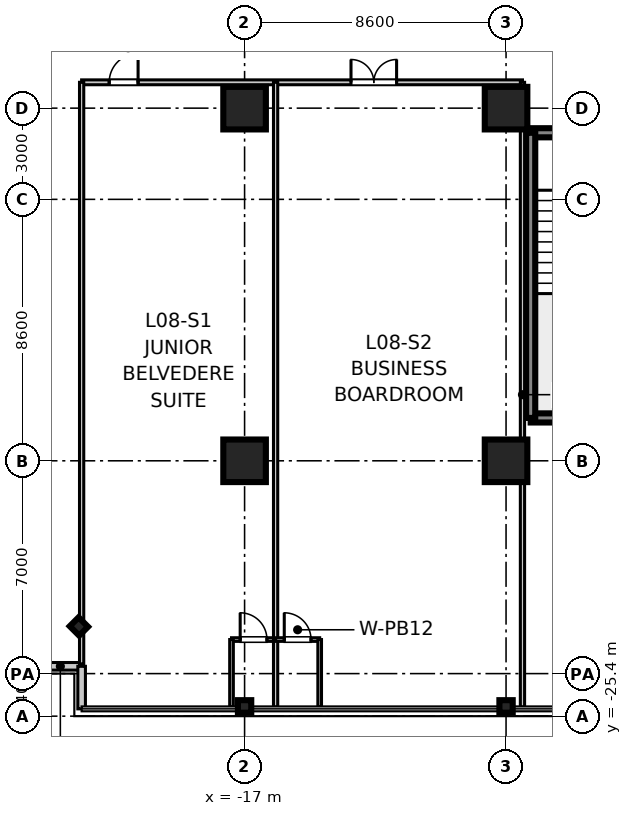
"""IFC4 building model, lengths in metres.
Left out: names, types, materials, properties, quantities, classifications, styles, units other than length and angle.
Written with IfcOpenShell. Run it as: python <this file> out.ifc"""

import sys

from ifc_helpers import new_model, si_unit, direction, frame, frame_2d, origin, origin_2d, place, context, subcontext, project, spatial, rectangle, i_section, extrude, source, transform, mapped, element, fill, save


model = new_model("IFC4")
c1 = context("Model", 3, precision=1e-05, world=origin(), true_north=direction((0.0, 1.0)))
c2 = subcontext(c1, "Body", "Model", "MODEL_VIEW")
j1 = project(units=[si_unit("LENGTHUNIT", "METRE"), si_unit("PLANEANGLEUNIT", "RADIAN")], contexts=[c1])
p1 = place(None, origin())
s1 = spatial("IfcSite", under=j1, at=p1, CompositionType="ELEMENT")
p2 = place(p1, origin())
s2 = spatial("IfcBuilding", under=s1, at=p2, CompositionType="ELEMENT")
p3 = place(p2, frame((0.0, 0.0, 39.7)))
s3 = spatial("IfcBuildingStorey", under=s2, at=p3, CompositionType="ELEMENT", Elevation=39.7)
m1 = source(origin(), c2, "Body", "SweptSolid", [
    extrude(rectangle(XDim=1.4, YDim=1.4, at=origin_2d()), origin(), (0.0, 0.0, 1.0), 3.605),
])
for number, where, z_axis, x_axis in (
    (1, (-17.0, -17.0, 0.0), (0.0, 0.0, 1.0), (1.0, 0.0, 0.0)),
    (2, (-17.0, -5.4, 0.0), (0.0, 0.0, 1.0), (1.0, 0.0, 0.0)),
    (3, (-8.4, -17.0, 0.0), (0.0, 0.0, 1.0), (1.0, 0.0, 0.0)),
    (4, (-8.4, -5.4, 0.0), (0.0, 0.0, 1.0), (1.0, 0.0, 0.0)),
):
    element("IfcColumn", number, at=place(p3, frame(where, z_axis=z_axis, x_axis=x_axis)), inside=s3, PredefinedType="COLUMN", context=c2, shape_type="MappedRepresentation", body=[
        mapped(m1, transform((0.0, 0.0, 0.0), scale=1.0)),
    ])
m2 = source(origin(), c2, "Body", "SweptSolid", [
    extrude(i_section(OverallWidth=0.412, OverallDepth=0.438, WebThickness=0.023, FlangeThickness=0.036, at=origin_2d()), origin(), (0.0, 0.0, 1.0), 3.605),
])
for number, where, z_axis, x_axis in (
    (5, (-17.0, -25.08, 0.0), (0.0, 0.0, 1.0), (0.0, 1.0, 0.0)),
    (6, (-8.4, -25.08, 0.0), (0.0, 0.0, 1.0), (0.0, 1.0, 0.0)),
    (7, (-22.45, -22.45, 0.0), (0.0, 0.0, 1.0), (0.707, 0.707, 0.0)),
):
    element("IfcColumn", number, at=place(p3, frame(where, z_axis=z_axis, x_axis=x_axis)), inside=s3, PredefinedType="COLUMN", context=c2, shape_type="MappedRepresentation", body=[
        mapped(m2, transform((0.0, 0.0, 0.0), scale=1.0)),
    ])
m3 = source(origin(), c2, "Body", "SweptSolid", [
    extrude(rectangle(XDim=3.98, YDim=0.3, at=frame_2d((1.99, 0.0))), origin(), (0.0, 0.0, 1.0), 3.37),
])
p4 = place(p3, frame((-7.59, -15.59, 0.0), z_axis=(0.0, 0.0, 1.0), x_axis=(1.0, 0.0, 0.0)))
e8 = element("IfcWall", 8, at=p4, inside=s3, PredefinedType="SHEAR", context=c2, shape_type="MappedRepresentation", body=[
    mapped(m3, transform((0.0, 0.0, 0.0), scale=1.0)),
])
p5 = place(p3, frame((-7.59, -6.21, 0.0), z_axis=(0.0, 0.0, 1.0), x_axis=(1.0, 0.0, 0.0)))
e9 = element("IfcWall", 9, at=p5, inside=s3, PredefinedType="SHEAR", context=c2, shape_type="MappedRepresentation", body=[
    mapped(m3, transform((0.0, 0.0, 0.0), scale=1.0)),
])
p6 = place(p5, frame((1.44, 0.0, 0.0)))
e10 = element("IfcOpeningElement", 10, at=p6, cuts=e9, PredefinedType="OPENING", context=c2, shape_type="SweptSolid", body=[
    extrude(rectangle(XDim=1.1, YDim=2.15, at=frame_2d((0.55, 1.075))), frame((0.0, 0.16, 0.0), z_axis=(0.0, -1.0, 0.0), x_axis=(1.0, 0.0, 0.0)), (0.0, 0.0, 1.0), 0.32),
])
m4 = source(origin(), c2, "Body", "SweptSolid", [
    extrude(rectangle(XDim=9.38, YDim=0.3, at=frame_2d((4.69, 0.0))), origin(), (0.0, 0.0, 1.0), 3.37),
])
p7 = place(p3, frame((-7.59, -15.59, 0.0), z_axis=(0.0, 0.0, 1.0), x_axis=(0.0, 1.0, 0.0)))
e11 = element("IfcWall", 11, at=p7, inside=s3, PredefinedType="SHEAR", context=c2, shape_type="MappedRepresentation", body=[
    mapped(m4, transform((0.0, 0.0, 0.0), scale=1.0)),
])
m5 = source(origin(), c2, "Body", "SweptSolid", [
    extrude(rectangle(XDim=1.4, YDim=0.25, at=frame_2d((0.7, 0.0))), origin(), (0.0, 0.0, 1.0), 3.37),
])
for number, where, z_axis, x_axis in (
    (12, (-23.76, -23.76, 0.0), (0.0, 0.0, 1.0), (1.0, 0.0, 0.0)),
    (13, (-22.36, -25.16, 0.0), (0.0, 0.0, 1.0), (0.0, 1.0, 0.0)),
):
    element("IfcWall", number, at=place(p3, frame(where, z_axis=z_axis, x_axis=x_axis)), inside=s3, PredefinedType="STANDARD", context=c2, shape_type="MappedRepresentation", body=[
        mapped(m5, transform((0.0, 0.0, 0.0), scale=1.0)),
    ])
m6 = source(origin(), c2, "Body", "SweptSolid", [
    extrude(rectangle(XDim=14.5, YDim=0.16, at=frame_2d((7.25, 0.0))), origin(), (0.0, 0.0, 1.0), 2.71),
])
p8 = place(p3, frame((-22.36, -4.55, 0.0), z_axis=(0.0, 0.0, 1.0), x_axis=(1.0, 0.0, 0.0)))
e14 = element("IfcWall", 14, at=p8, inside=s3, PredefinedType="PARTITIONING", context=c2, shape_type="MappedRepresentation", body=[
    mapped(m6, transform((0.0, 0.0, 0.0), scale=1.0)),
])
p9 = place(p8, frame((0.907, 0.0, 0.0)))
e15 = element("IfcOpeningElement", 15, at=p9, cuts=e14, PredefinedType="OPENING", context=c2, shape_type="SweptSolid", body=[
    extrude(rectangle(XDim=0.95, YDim=2.1, at=frame_2d((0.475, 1.05))), frame((0.0, 0.09, 0.0), z_axis=(0.0, -1.0, 0.0), x_axis=(1.0, 0.0, 0.0)), (0.0, 0.0, 1.0), 0.18),
])
p10 = place(p8, frame((8.86, 0.0, 0.0)))
e16 = element("IfcOpeningElement", 16, at=p10, cuts=e14, PredefinedType="OPENING", context=c2, shape_type="SweptSolid", body=[
    extrude(rectangle(XDim=1.5, YDim=2.15, at=frame_2d((0.75, 1.075))), frame((0.0, 0.09, 0.0), z_axis=(0.0, -1.0, 0.0), x_axis=(1.0, 0.0, 0.0)), (0.0, 0.0, 1.0), 0.18),
])
m7 = source(origin(), c2, "Body", "SweptSolid", [
    extrude(rectangle(XDim=19.13, YDim=0.14, at=frame_2d((9.565, 0.0))), origin(), (0.0, 0.0, 1.0), 2.71),
])
p11 = place(p3, frame((-22.36, -23.68, 0.0), z_axis=(0.0, 0.0, 1.0), x_axis=(0.0, 1.0, 0.0)))
e17 = element("IfcWall", 17, at=p11, inside=s3, PredefinedType="PARTITIONING", context=c2, shape_type="MappedRepresentation", body=[
    mapped(m7, transform((0.0, 0.0, 0.0), scale=1.0)),
])
m8 = source(origin(), c2, "Body", "SweptSolid", [
    extrude(rectangle(XDim=20.55, YDim=0.14, at=frame_2d((10.275, 0.0))), origin(), (0.0, 0.0, 1.0), 2.71),
])
p12 = place(p3, frame((-7.86, -25.1, 0.0), z_axis=(0.0, 0.0, 1.0), x_axis=(0.0, 1.0, 0.0)))
e18 = element("IfcWall", 18, at=p12, inside=s3, PredefinedType="PARTITIONING", context=c2, shape_type="MappedRepresentation", body=[
    mapped(m8, transform((0.0, 0.0, 0.0), scale=1.0)),
])
m9 = source(origin(), c2, "Body", "SweptSolid", [
    extrude(rectangle(XDim=1.45, YDim=0.12, at=frame_2d((0.725, 0.0))), origin(), (0.0, 0.0, 1.0), 2.71),
])
p13 = place(p3, frame((-17.43, -22.88, 0.0), z_axis=(0.0, 0.0, 1.0), x_axis=(1.0, 0.0, 0.0)))
e19 = element("IfcWall", 19, at=p13, inside=s3, PredefinedType="PARTITIONING", context=c2, shape_type="MappedRepresentation", body=[
    mapped(m9, transform((0.0, 0.0, 0.0), scale=1.0)),
])
p14 = place(p13, frame((0.285, 0.0, 0.0)))
e20 = element("IfcOpeningElement", 20, at=p14, cuts=e19, PredefinedType="OPENING", context=c2, shape_type="SweptSolid", body=[
    extrude(rectangle(XDim=0.88, YDim=2.1, at=frame_2d((0.44, 1.05))), frame((0.0, 0.07, 0.0), z_axis=(0.0, -1.0, 0.0), x_axis=(1.0, 0.0, 0.0)), (0.0, 0.0, 1.0), 0.14),
])
m10 = source(origin(), c2, "Body", "SweptSolid", [
    extrude(rectangle(XDim=2.22, YDim=0.12, at=frame_2d((1.11, 0.0))), origin(), (0.0, 0.0, 1.0), 2.71),
])
p15 = place(p3, frame((-17.43, -25.1, 0.0), z_axis=(0.0, 0.0, 1.0), x_axis=(0.0, 1.0, 0.0)))
e21 = element("IfcWall", 21, at=p15, inside=s3, PredefinedType="PARTITIONING", context=c2, shape_type="MappedRepresentation", body=[
    mapped(m10, transform((0.0, 0.0, 0.0), scale=1.0)),
])
p16 = place(p3, frame((-15.98, -25.1, 0.0), z_axis=(0.0, 0.0, 1.0), x_axis=(0.0, 1.0, 0.0)))
e22 = element("IfcWall", 22, at=p16, inside=s3, PredefinedType="PARTITIONING", context=c2, shape_type="MappedRepresentation", body=[
    mapped(m8, transform((0.0, 0.0, 0.0), scale=1.0)),
])
p17 = place(p3, frame((-15.98, -22.88, 0.0), z_axis=(0.0, 0.0, 1.0), x_axis=(1.0, 0.0, 0.0)))
e23 = element("IfcWall", 23, at=p17, inside=s3, PredefinedType="PARTITIONING", context=c2, shape_type="MappedRepresentation", body=[
    mapped(m9, transform((0.0, 0.0, 0.0), scale=1.0)),
])
p18 = place(p17, frame((0.285, 0.0, 0.0)))
e24 = element("IfcOpeningElement", 24, at=p18, cuts=e23, PredefinedType="OPENING", context=c2, shape_type="SweptSolid", body=[
    extrude(rectangle(XDim=0.88, YDim=2.1, at=frame_2d((0.44, 1.05))), frame((0.0, 0.07, 0.0), z_axis=(0.0, -1.0, 0.0), x_axis=(1.0, 0.0, 0.0)), (0.0, 0.0, 1.0), 0.14),
])
p19 = place(p3, frame((-14.53, -25.1, 0.0), z_axis=(0.0, 0.0, 1.0), x_axis=(0.0, 1.0, 0.0)))
e25 = element("IfcWall", 25, at=p19, inside=s3, PredefinedType="PARTITIONING", context=c2, shape_type="MappedRepresentation", body=[
    mapped(m10, transform((0.0, 0.0, 0.0), scale=1.0)),
])
m11 = source(origin(), c2, "Body", "SweptSolid", [
    extrude(rectangle(XDim=0.88, YDim=2.1, at=frame_2d((0.44, 1.05))), frame((0.0, 0.025, 0.0), z_axis=(0.0, -1.0, 0.0), x_axis=(1.0, 0.0, 0.0)), (0.0, 0.0, 1.0), 0.05),
])
p20 = place(p14, frame((0.88, 0.0, 0.0), z_axis=(0.0, 0.0, 1.0), x_axis=(-1.0, 0.0, 0.0)))
e26 = element("IfcDoor", 26, at=p20, inside=s3, OperationType="SINGLE_SWING_LEFT", PredefinedType="DOOR", context=c2, shape_type="MappedRepresentation", body=[
    mapped(m11, transform((0.0, 0.0, 0.0), scale=1.0)),
])
fill(e20, e26)
m12 = source(origin(), c2, "Body", "SweptSolid", [
    extrude(rectangle(XDim=0.95, YDim=2.1, at=frame_2d((0.475, 1.05))), frame((0.0, 0.025, 0.0), z_axis=(0.0, -1.0, 0.0), x_axis=(1.0, 0.0, 0.0)), (0.0, 0.0, 1.0), 0.05),
])
p21 = place(p9, frame((0.95, 0.0, 0.0), z_axis=(0.0, 0.0, 1.0), x_axis=(-1.0, 0.0, 0.0)))
e27 = element("IfcDoor", 27, at=p21, inside=s3, OperationType="SINGLE_SWING_RIGHT", PredefinedType="DOOR", context=c2, shape_type="MappedRepresentation", body=[
    mapped(m12, transform((0.0, 0.0, 0.0), scale=1.0)),
])
fill(e15, e27)
p22 = place(p18, frame((0.88, 0.0, 0.0), z_axis=(0.0, 0.0, 1.0), x_axis=(-1.0, 0.0, 0.0)))
e28 = element("IfcDoor", 28, at=p22, inside=s3, OperationType="SINGLE_SWING_LEFT", PredefinedType="DOOR", context=c2, shape_type="MappedRepresentation", body=[
    mapped(m11, transform((0.0, 0.0, 0.0), scale=1.0)),
])
fill(e24, e28)
m13 = source(origin(), c2, "Body", "SweptSolid", [
    extrude(rectangle(XDim=1.5, YDim=2.15, at=frame_2d((0.75, 1.075))), frame((0.0, 0.025, 0.0), z_axis=(0.0, -1.0, 0.0), x_axis=(1.0, 0.0, 0.0)), (0.0, 0.0, 1.0), 0.05),
])
p23 = place(p10, frame((1.5, 0.0, 0.0), z_axis=(0.0, 0.0, 1.0), x_axis=(-1.0, 0.0, 0.0)))
e29 = element("IfcDoor", 29, at=p23, inside=s3, OperationType="DOUBLE_DOOR_SINGLE_SWING", PredefinedType="DOOR", context=c2, shape_type="MappedRepresentation", body=[
    mapped(m13, transform((0.0, 0.0, 0.0), scale=1.0)),
])
fill(e16, e29)
save(model, sys.argv[1])
